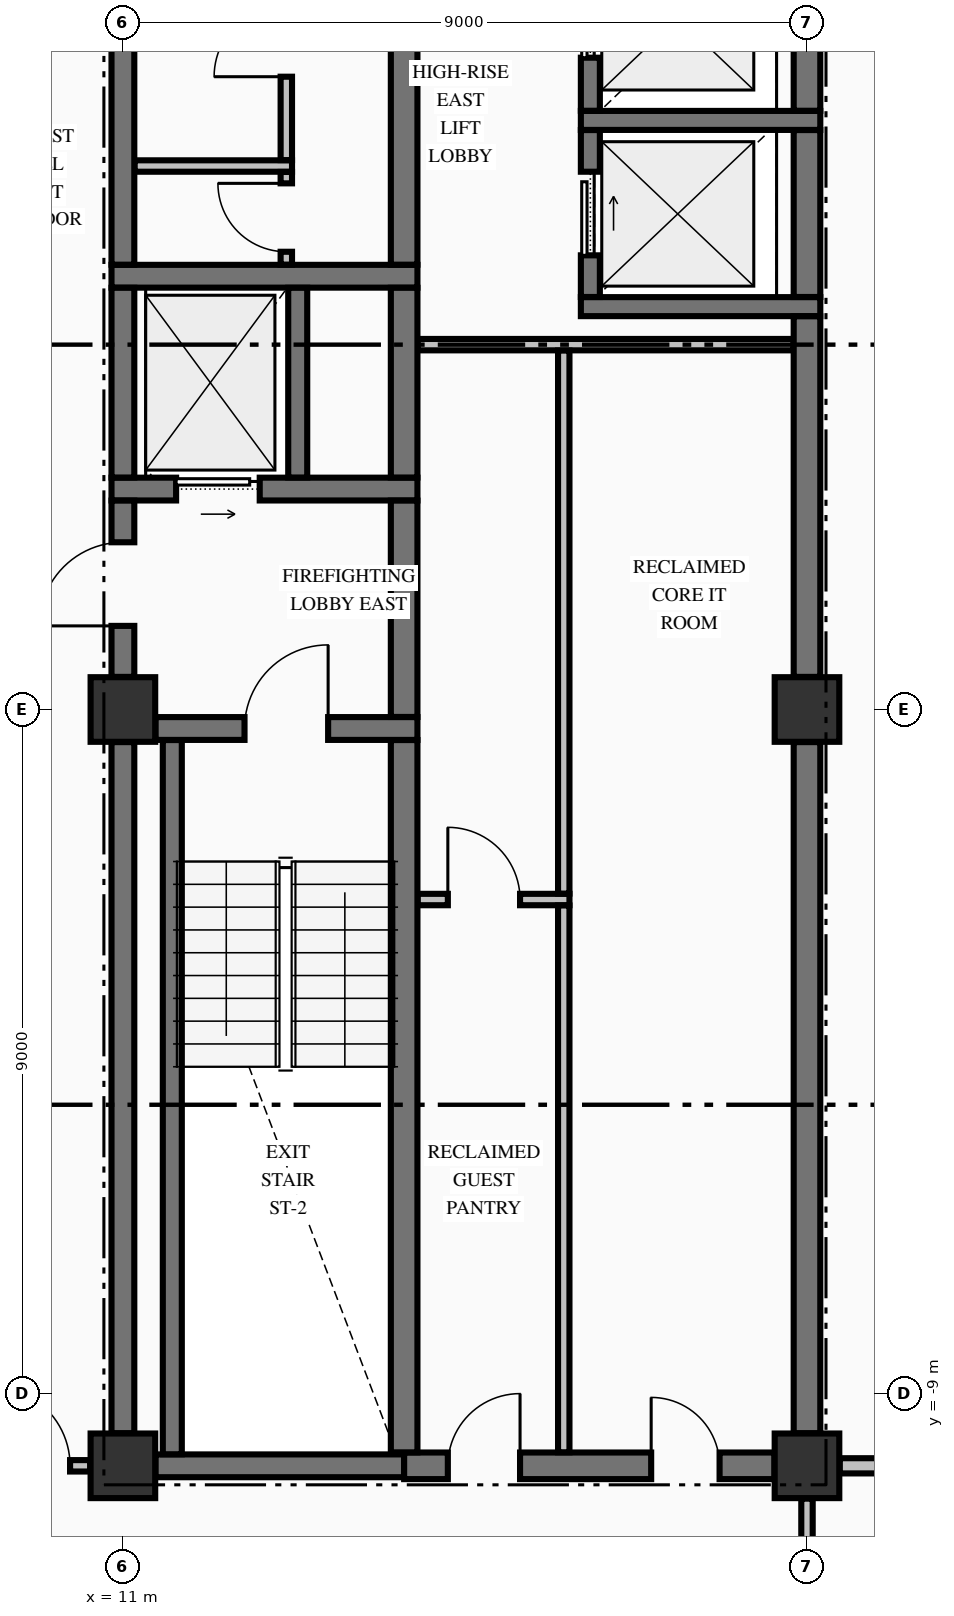
"""IFC4 building model, lengths in metres.
Left out: names, types, materials, properties, quantities, classifications, styles, units other than length and angle.
Written with IfcOpenShell. Run it as: python <this file> out.ifc"""

import sys

from ifc_helpers import new_model, si_unit, direction, frame, frame_2d, origin, origin_2d, place, context, subcontext, project, spatial, rectangle, extrude, element, fill, save


model = new_model("IFC4")
c1 = context("Model", 3, precision=1e-05, world=origin(), true_north=direction((0.0, 1.0)))
c2 = subcontext(c1, "Body", "Model", "MODEL_VIEW")
j1 = project(units=[si_unit("LENGTHUNIT", "METRE"), si_unit("PLANEANGLEUNIT", "RADIAN")], contexts=[c1])
p1 = place(None, origin())
s1 = spatial("IfcSite", under=j1, at=p1, CompositionType="ELEMENT")
p2 = place(p1, origin())
s2 = spatial("IfcBuilding", under=s1, at=p2, CompositionType="ELEMENT")
p3 = place(p2, frame((0.0, 0.0, 162.66)))
s3 = spatial("IfcBuildingStorey", under=s2, at=p3, CompositionType="ELEMENT", Elevation=162.66)
for number, where, z_axis, x_axis in (
    (1, (11.0, -9.95, -0.25), (0.0, 0.0, 1.0), (1.0, 0.0, 0.0)),
    (2, (11.0, 0.0, -0.25), (0.0, 0.0, 1.0), (1.0, 0.0, 0.0)),
    (3, (20.0, -9.95, -0.25), (0.0, 0.0, 1.0), (1.0, 0.0, 0.0)),
    (4, (20.0, 0.0, -0.25), (0.0, 0.0, 1.0), (1.0, 0.0, 0.0)),
):
    element("IfcColumn", number, at=place(p3, frame(where, z_axis=z_axis, x_axis=x_axis)), inside=s3, PredefinedType="COLUMN", context=c2, shape_type="SweptSolid", body=[
        extrude(rectangle(XDim=0.85, YDim=0.85, at=origin_2d()), origin(), (0.0, 0.0, 1.0), 3.4),
    ])
p4 = place(p3, frame((11.429, -9.95, 0.0), z_axis=(0.0, 0.0, 1.0), x_axis=(1.0, 0.0, 0.0)))
e5 = element("IfcWall", 5, at=p4, inside=s3, PredefinedType="SHEAR", context=c2, shape_type="SweptSolid", body=[
    extrude(rectangle(XDim=3.271, YDim=0.3, at=frame_2d((1.635, 0.0))), origin(), (0.0, 0.0, 1.0), 3.15),
])
p5 = place(p3, frame((14.7, -9.95, 0.0), z_axis=(0.0, 0.0, 1.0), x_axis=(1.0, 0.0, 0.0)))
e6 = element("IfcWall", 6, at=p5, inside=s3, PredefinedType="SHEAR", context=c2, shape_type="SweptSolid", body=[
    extrude(rectangle(XDim=4.871, YDim=0.35, at=frame_2d((2.436, 0.0))), origin(), (0.0, 0.0, 1.0), 3.15),
])
p6 = place(p5, frame((3.25, 0.0, 0.0)))
e7 = element("IfcOpeningElement", 7, at=p6, cuts=e6, PredefinedType="OPENING", context=c2, shape_type="SweptSolid", body=[
    extrude(rectangle(XDim=0.9, YDim=2.15, at=frame_2d((0.45, 1.075))), frame((0.0, 0.185, 0.0), z_axis=(0.0, -1.0, 0.0), x_axis=(1.0, 0.0, 0.0)), (0.0, 0.0, 1.0), 0.37),
])
p7 = place(p5, frame((0.575, 0.0, 0.0)))
e8 = element("IfcOpeningElement", 8, at=p7, cuts=e6, PredefinedType="OPENING", context=c2, shape_type="SweptSolid", body=[
    extrude(rectangle(XDim=0.95, YDim=2.15, at=frame_2d((0.475, 1.075))), frame((0.0, 0.185, 0.0), z_axis=(0.0, -1.0, 0.0), x_axis=(1.0, 0.0, 0.0)), (0.0, 0.0, 1.0), 0.37),
])
p8 = place(p3, frame((11.429, -0.25, 0.0), z_axis=(0.0, 0.0, 1.0), x_axis=(1.0, 0.0, 0.0)))
e9 = element("IfcWall", 9, at=p8, inside=s3, PredefinedType="SHEAR", context=c2, shape_type="SweptSolid", body=[
    extrude(rectangle(XDim=3.446, YDim=0.3, at=frame_2d((1.723, 0.0))), origin(), (0.0, 0.0, 1.0), 3.15),
])
p9 = place(p8, frame((1.171, 0.0, 0.0)))
e10 = element("IfcOpeningElement", 10, at=p9, cuts=e9, PredefinedType="OPENING", context=c2, shape_type="SweptSolid", body=[
    extrude(rectangle(XDim=1.1, YDim=2.15, at=frame_2d((0.55, 1.075))), frame((0.0, 0.16, 0.0), z_axis=(0.0, -1.0, 0.0), x_axis=(1.0, 0.0, 0.0)), (0.0, 0.0, 1.0), 0.32),
])
p10 = place(p3, frame((10.85, 2.9, 0.0), z_axis=(0.0, 0.0, 1.0), x_axis=(1.0, 0.0, 0.0)))
e11 = element("IfcWall", 11, at=p10, inside=s3, PredefinedType="SHEAR", context=c2, shape_type="SweptSolid", body=[
    extrude(rectangle(XDim=4.025, YDim=0.3, at=frame_2d((2.012, 0.0))), origin(), (0.0, 0.0, 1.0), 3.15),
])
p11 = place(p10, frame((0.85, 0.0, 0.0)))
e12 = element("IfcOpeningElement", 12, at=p11, cuts=e11, PredefinedType="OPENING", context=c2, shape_type="SweptSolid", body=[
    extrude(rectangle(XDim=1.1, YDim=2.2, at=frame_2d((0.55, 1.1))), frame((0.0, 0.16, 0.0), z_axis=(0.0, -1.0, 0.0), x_axis=(1.0, 0.0, 0.0)), (0.0, 0.0, 1.0), 0.32),
])
p12 = place(p3, frame((17.025, 5.3, 0.0), z_axis=(0.0, 0.0, 1.0), x_axis=(1.0, 0.0, 0.0)))
e13 = element("IfcWall", 13, at=p12, inside=s3, PredefinedType="SOLIDWALL", context=c2, shape_type="SweptSolid", body=[
    extrude(rectangle(XDim=3.15, YDim=0.25, at=frame_2d((1.575, 0.0))), origin(), (0.0, 0.0, 1.0), 3.15),
])
p13 = place(p3, frame((10.85, 5.7, 0.0), z_axis=(0.0, 0.0, 1.0), x_axis=(1.0, 0.0, 0.0)))
e14 = element("IfcWall", 14, at=p13, inside=s3, PredefinedType="SHEAR", context=c2, shape_type="SweptSolid", body=[
    extrude(rectangle(XDim=4.025, YDim=0.3, at=frame_2d((2.012, 0.0))), origin(), (0.0, 0.0, 1.0), 3.15),
])
p14 = place(p3, frame((17.025, 7.75, 0.0), z_axis=(0.0, 0.0, 1.0), x_axis=(1.0, 0.0, 0.0)))
e15 = element("IfcWall", 15, at=p14, inside=s3, PredefinedType="SOLIDWALL", context=c2, shape_type="SweptSolid", body=[
    extrude(rectangle(XDim=3.15, YDim=0.25, at=frame_2d((1.575, 0.0))), origin(), (0.0, 0.0, 1.0), 3.15),
])
p15 = place(p3, frame((-10.569, -9.95, 0.0), z_axis=(0.0, 0.0, 1.0), x_axis=(1.0, 0.0, 0.0)))
e16 = element("IfcWall", 16, at=p15, inside=s3, PredefinedType="PARTITIONING", context=c2, shape_type="SweptSolid", body=[
    extrude(rectangle(XDim=21.138, YDim=0.15, at=frame_2d((10.569, 0.0))), origin(), (0.0, 0.0, 1.0), 3.15),
])
p16 = place(p15, frame((0.264, 0.0, 0.0)))
e17 = element("IfcOpeningElement", 17, at=p16, cuts=e16, PredefinedType="OPENING", context=c2, shape_type="SweptSolid", body=[
    extrude(rectangle(XDim=1.05, YDim=2.15, at=frame_2d((0.525, 1.075))), frame((0.0, 0.085, 0.0), z_axis=(0.0, -1.0, 0.0), x_axis=(1.0, 0.0, 0.0)), (0.0, 0.0, 1.0), 0.17),
])
p17 = place(p15, frame((19.824, 0.0, 0.0)))
e18 = element("IfcOpeningElement", 18, at=p17, cuts=e16, PredefinedType="OPENING", context=c2, shape_type="SweptSolid", body=[
    extrude(rectangle(XDim=1.05, YDim=2.15, at=frame_2d((0.525, 1.075))), frame((0.0, 0.085, 0.0), z_axis=(0.0, -1.0, 0.0), x_axis=(1.0, 0.0, 0.0)), (0.0, 0.0, 1.0), 0.17),
])
p18 = place(p15, frame((13.774, 0.0, 0.0)))
e19 = element("IfcOpeningElement", 19, at=p18, cuts=e16, PredefinedType="OPENING", context=c2, shape_type="SweptSolid", body=[
    extrude(rectangle(XDim=0.95, YDim=2.15, at=frame_2d((0.475, 1.075))), frame((0.0, 0.085, 0.0), z_axis=(0.0, -1.0, 0.0), x_axis=(1.0, 0.0, 0.0)), (0.0, 0.0, 1.0), 0.17),
])
p19 = place(p3, frame((20.431, -9.95, 0.0), z_axis=(0.0, 0.0, 1.0), x_axis=(1.0, 0.0, 0.0)))
e20 = element("IfcWall", 20, at=p19, inside=s3, PredefinedType="PARTITIONING", context=c2, shape_type="SweptSolid", body=[
    extrude(rectangle(XDim=6.404, YDim=0.2, at=frame_2d((3.202, 0.0))), origin(), (0.0, 0.0, 1.0), 3.15),
])
p20 = place(p3, frame((14.878, -2.5, 0.0), z_axis=(0.0, 0.0, 1.0), x_axis=(1.0, 0.0, 0.0)))
e21 = element("IfcWall", 21, at=p20, inside=s3, PredefinedType="PARTITIONING", context=c2, shape_type="SweptSolid", body=[
    extrude(rectangle(XDim=1.997, YDim=0.15, at=frame_2d((0.999, 0.0))), origin(), (0.0, 0.0, 1.0), 3.15),
])
p21 = place(p20, frame((0.397, 0.0, 0.0)))
e22 = element("IfcOpeningElement", 22, at=p21, cuts=e21, PredefinedType="OPENING", context=c2, shape_type="SweptSolid", body=[
    extrude(rectangle(XDim=0.95, YDim=2.15, at=frame_2d((0.475, 1.075))), frame((0.0, 0.085, 0.0), z_axis=(0.0, -1.0, 0.0), x_axis=(1.0, 0.0, 0.0)), (0.0, 0.0, 1.0), 0.17),
])
p22 = place(p3, frame((14.878, 4.8, 0.0), z_axis=(0.0, 0.0, 1.0), x_axis=(1.0, 0.0, 0.0)))
e23 = element("IfcWall", 23, at=p22, inside=s3, PredefinedType="PARTITIONING", context=c2, shape_type="SweptSolid", body=[
    extrude(rectangle(XDim=4.944, YDim=0.15, at=frame_2d((2.472, 0.0))), origin(), (0.0, 0.0, 1.0), 3.15),
])
p23 = place(p3, frame((11.153, 7.15, 0.0), z_axis=(0.0, 0.0, 1.0), x_axis=(1.0, 0.0, 0.0)))
e24 = element("IfcWall", 24, at=p23, inside=s3, PredefinedType="PARTITIONING", context=c2, shape_type="SweptSolid", body=[
    extrude(rectangle(XDim=2.072, YDim=0.15, at=frame_2d((1.036, 0.0))), origin(), (0.0, 0.0, 1.0), 3.15),
])
p24 = place(p3, frame((11.0, -9.521, 0.0), z_axis=(0.0, 0.0, 1.0), x_axis=(0.0, 1.0, 0.0)))
e25 = element("IfcWall", 25, at=p24, inside=s3, PredefinedType="SHEAR", context=c2, shape_type="SweptSolid", body=[
    extrude(rectangle(XDim=9.092, YDim=0.3, at=frame_2d((4.546, 0.0))), origin(), (0.0, 0.0, 1.0), 3.15),
])
p25 = place(p3, frame((11.0, 0.429, 0.0), z_axis=(0.0, 0.0, 1.0), x_axis=(0.0, 1.0, 0.0)))
e26 = element("IfcWall", 26, at=p25, inside=s3, PredefinedType="SHEAR", context=c2, shape_type="SweptSolid", body=[
    extrude(rectangle(XDim=2.319, YDim=0.3, at=frame_2d((1.16, 0.0))), origin(), (0.0, 0.0, 1.0), 3.15),
])
p26 = place(p25, frame((0.671, 0.0, 0.0)))
e27 = element("IfcOpeningElement", 27, at=p26, cuts=e26, PredefinedType="OPENING", context=c2, shape_type="SweptSolid", body=[
    extrude(rectangle(XDim=1.1, YDim=2.15, at=frame_2d((0.55, 1.075))), frame((0.0, 0.16, 0.0), z_axis=(0.0, -1.0, 0.0), x_axis=(1.0, 0.0, 0.0)), (0.0, 0.0, 1.0), 0.32),
])
p27 = place(p3, frame((11.0, 3.052, 0.0), z_axis=(0.0, 0.0, 1.0), x_axis=(0.0, 1.0, 0.0)))
e28 = element("IfcWall", 28, at=p27, inside=s3, PredefinedType="SHEAR", context=c2, shape_type="SweptSolid", body=[
    extrude(rectangle(XDim=2.496, YDim=0.3, at=frame_2d((1.248, 0.0))), origin(), (0.0, 0.0, 1.0), 3.15),
])
p28 = place(p3, frame((11.0, 5.852, 0.0), z_axis=(0.0, 0.0, 1.0), x_axis=(0.0, 1.0, 0.0)))
e29 = element("IfcWall", 29, at=p28, inside=s3, PredefinedType="SHEAR", context=c2, shape_type="SweptSolid", body=[
    extrude(rectangle(XDim=4.219, YDim=0.3, at=frame_2d((2.109, 0.0))), origin(), (0.0, 0.0, 1.0), 3.15),
])
p29 = place(p3, frame((11.65, -9.798, 0.0), z_axis=(0.0, 0.0, 1.0), x_axis=(0.0, 1.0, 0.0)))
e30 = element("IfcWall", 30, at=p29, inside=s3, PredefinedType="SOLIDWALL", context=c2, shape_type="SweptSolid", body=[
    extrude(rectangle(XDim=9.396, YDim=0.25, at=frame_2d((4.698, 0.0))), origin(), (0.0, 0.0, 1.0), 3.15),
])
p30 = place(p3, frame((13.3, 3.052, 0.0), z_axis=(0.0, 0.0, 1.0), x_axis=(0.0, 1.0, 0.0)))
e31 = element("IfcWall", 31, at=p30, inside=s3, PredefinedType="SOLIDWALL", context=c2, shape_type="SweptSolid", body=[
    extrude(rectangle(XDim=2.496, YDim=0.25, at=frame_2d((1.248, 0.0))), origin(), (0.0, 0.0, 1.0), 3.15),
])
p31 = place(p3, frame((14.7, -9.773, 0.0), z_axis=(0.0, 0.0, 1.0), x_axis=(0.0, 1.0, 0.0)))
e32 = element("IfcWall", 32, at=p31, inside=s3, PredefinedType="SHEAR", context=c2, shape_type="SweptSolid", body=[
    extrude(rectangle(XDim=9.371, YDim=0.35, at=frame_2d((4.686, 0.0))), origin(), (0.0, 0.0, 1.0), 3.15),
])
p32 = place(p3, frame((14.7, -0.098, 0.0), z_axis=(0.0, 0.0, 1.0), x_axis=(0.0, 1.0, 0.0)))
e33 = element("IfcWall", 33, at=p32, inside=s3, PredefinedType="SHEAR", context=c2, shape_type="SweptSolid", body=[
    extrude(rectangle(XDim=2.846, YDim=0.35, at=frame_2d((1.423, 0.0))), origin(), (0.0, 0.0, 1.0), 3.15),
])
p33 = place(p3, frame((14.7, 3.052, 0.0), z_axis=(0.0, 0.0, 1.0), x_axis=(0.0, 1.0, 0.0)))
e34 = element("IfcWall", 34, at=p33, inside=s3, PredefinedType="SHEAR", context=c2, shape_type="SweptSolid", body=[
    extrude(rectangle(XDim=2.496, YDim=0.35, at=frame_2d((1.248, 0.0))), origin(), (0.0, 0.0, 1.0), 3.15),
])
p34 = place(p3, frame((14.7, 5.852, 0.0), z_axis=(0.0, 0.0, 1.0), x_axis=(0.0, 1.0, 0.0)))
e35 = element("IfcWall", 35, at=p34, inside=s3, PredefinedType="SHEAR", context=c2, shape_type="SweptSolid", body=[
    extrude(rectangle(XDim=4.471, YDim=0.35, at=frame_2d((2.235, 0.0))), origin(), (0.0, 0.0, 1.0), 3.15),
])
p35 = place(p3, frame((17.15, 5.427, 0.0), z_axis=(0.0, 0.0, 1.0), x_axis=(0.0, 1.0, 0.0)))
e36 = element("IfcWall", 36, at=p35, inside=s3, PredefinedType="SOLIDWALL", context=c2, shape_type="SweptSolid", body=[
    extrude(rectangle(XDim=2.196, YDim=0.25, at=frame_2d((1.098, 0.0))), origin(), (0.0, 0.0, 1.0), 3.15),
])
p36 = place(p35, frame((0.548, 0.0, 0.0)))
e37 = element("IfcOpeningElement", 37, at=p36, cuts=e36, PredefinedType="OPENING", context=c2, shape_type="SweptSolid", body=[
    extrude(rectangle(XDim=1.1, YDim=2.2, at=frame_2d((0.55, 1.1))), frame((0.0, 0.135, 0.0), z_axis=(0.0, -1.0, 0.0), x_axis=(1.0, 0.0, 0.0)), (0.0, 0.0, 1.0), 0.27),
])
p37 = place(p3, frame((17.15, 7.877, 0.0), z_axis=(0.0, 0.0, 1.0), x_axis=(0.0, 1.0, 0.0)))
e38 = element("IfcWall", 38, at=p37, inside=s3, PredefinedType="SOLIDWALL", context=c2, shape_type="SweptSolid", body=[
    extrude(rectangle(XDim=2.446, YDim=0.25, at=frame_2d((1.223, 0.0))), origin(), (0.0, 0.0, 1.0), 3.15),
])
p38 = place(p37, frame((0.698, 0.0, 0.0)))
e39 = element("IfcOpeningElement", 39, at=p38, cuts=e38, PredefinedType="OPENING", context=c2, shape_type="SweptSolid", body=[
    extrude(rectangle(XDim=1.1, YDim=2.2, at=frame_2d((0.55, 1.1))), frame((0.0, 0.135, 0.0), z_axis=(0.0, -1.0, 0.0), x_axis=(1.0, 0.0, 0.0)), (0.0, 0.0, 1.0), 0.27),
])
p39 = place(p3, frame((20.0, -9.521, 0.0), z_axis=(0.0, 0.0, 1.0), x_axis=(0.0, 1.0, 0.0)))
e40 = element("IfcWall", 40, at=p39, inside=s3, PredefinedType="SHEAR", context=c2, shape_type="SweptSolid", body=[
    extrude(rectangle(XDim=9.092, YDim=0.35, at=frame_2d((4.546, 0.0))), origin(), (0.0, 0.0, 1.0), 3.15),
])
p40 = place(p3, frame((20.0, 0.429, 0.0), z_axis=(0.0, 0.0, 1.0), x_axis=(0.0, 1.0, 0.0)))
e41 = element("IfcWall", 41, at=p40, inside=s3, PredefinedType="SHEAR", context=c2, shape_type="SweptSolid", body=[
    extrude(rectangle(XDim=4.744, YDim=0.35, at=frame_2d((2.372, 0.0))), origin(), (0.0, 0.0, 1.0), 3.15),
])
p41 = place(p3, frame((20.0, 5.427, 0.0), z_axis=(0.0, 0.0, 1.0), x_axis=(0.0, 1.0, 0.0)))
e42 = element("IfcWall", 42, at=p41, inside=s3, PredefinedType="SHEAR", context=c2, shape_type="SweptSolid", body=[
    extrude(rectangle(XDim=2.196, YDim=0.35, at=frame_2d((1.098, 0.0))), origin(), (0.0, 0.0, 1.0), 3.15),
])
p42 = place(p3, frame((20.0, 7.877, 0.0), z_axis=(0.0, 0.0, 1.0), x_axis=(0.0, 1.0, 0.0)))
e43 = element("IfcWall", 43, at=p42, inside=s3, PredefinedType="SHEAR", context=c2, shape_type="SweptSolid", body=[
    extrude(rectangle(XDim=2.194, YDim=0.35, at=frame_2d((1.097, 0.0))), origin(), (0.0, 0.0, 1.0), 3.15),
])
p43 = place(p3, frame((13.15, 5.853, 0.0), z_axis=(0.0, 0.0, 1.0), x_axis=(0.0, 1.0, 0.0)))
e44 = element("IfcWall", 44, at=p43, inside=s3, PredefinedType="PARTITIONING", context=c2, shape_type="SweptSolid", body=[
    extrude(rectangle(XDim=1.219, YDim=0.15, at=frame_2d((0.609, 0.0))), origin(), (0.0, 0.0, 1.0), 3.15),
])
p44 = place(p43, frame((0.169, 0.0, 0.0)))
e45 = element("IfcOpeningElement", 45, at=p44, cuts=e44, PredefinedType="OPENING", context=c2, shape_type="SweptSolid", body=[
    extrude(rectangle(XDim=0.9, YDim=2.15, at=frame_2d((0.45, 1.075))), frame((0.0, 0.085, 0.0), z_axis=(0.0, -1.0, 0.0), x_axis=(1.0, 0.0, 0.0)), (0.0, 0.0, 1.0), 0.17),
])
p45 = place(p3, frame((13.15, 7.228, 0.0), z_axis=(0.0, 0.0, 1.0), x_axis=(0.0, 1.0, 0.0)))
e46 = element("IfcWall", 46, at=p45, inside=s3, PredefinedType="PARTITIONING", context=c2, shape_type="SweptSolid", body=[
    extrude(rectangle(XDim=3.119, YDim=0.15, at=frame_2d((1.56, 0.0))), origin(), (0.0, 0.0, 1.0), 3.15),
])
p46 = place(p45, frame((1.097, 0.0, 0.0)))
e47 = element("IfcOpeningElement", 47, at=p46, cuts=e46, PredefinedType="OPENING", context=c2, shape_type="SweptSolid", body=[
    extrude(rectangle(XDim=0.95, YDim=2.15, at=frame_2d((0.475, 1.075))), frame((0.0, 0.085, 0.0), z_axis=(0.0, -1.0, 0.0), x_axis=(1.0, 0.0, 0.0)), (0.0, 0.0, 1.0), 0.17),
])
p47 = place(p3, frame((16.8, -9.772, 0.0), z_axis=(0.0, 0.0, 1.0), x_axis=(0.0, 1.0, 0.0)))
e48 = element("IfcWall", 48, at=p47, inside=s3, PredefinedType="PARTITIONING", context=c2, shape_type="SweptSolid", body=[
    extrude(rectangle(XDim=7.194, YDim=0.15, at=frame_2d((3.597, 0.0))), origin(), (0.0, 0.0, 1.0), 3.15),
])
p48 = place(p3, frame((16.8, -2.422, 0.0), z_axis=(0.0, 0.0, 1.0), x_axis=(0.0, 1.0, 0.0)))
e49 = element("IfcWall", 49, at=p48, inside=s3, PredefinedType="PARTITIONING", context=c2, shape_type="SweptSolid", body=[
    extrude(rectangle(XDim=7.144, YDim=0.15, at=frame_2d((3.572, 0.0))), origin(), (0.0, 0.0, 1.0), 3.15),
])
p49 = place(p3, frame((20.0, -12.997, 0.0), z_axis=(0.0, 0.0, 1.0), x_axis=(0.0, 1.0, 0.0)))
e50 = element("IfcWall", 50, at=p49, inside=s3, PredefinedType="PARTITIONING", context=c2, shape_type="SweptSolid", body=[
    extrude(rectangle(XDim=2.616, YDim=0.15, at=frame_2d((1.308, 0.0))), origin(), (0.0, 0.0, 1.0), 2.342),
])
p50 = place(p9, origin())
e51 = element("IfcDoor", 51, at=p50, inside=s3, OperationType="SINGLE_SWING_RIGHT", PredefinedType="DOOR", context=c2, shape_type="SweptSolid", body=[
    extrude(rectangle(XDim=1.1, YDim=2.15, at=frame_2d((0.55, 1.075))), frame((0.0, 0.025, 0.0), z_axis=(0.0, -1.0, 0.0), x_axis=(1.0, 0.0, 0.0)), (0.0, 0.0, 1.0), 0.05),
])
fill(e10, e51)
p51 = place(p26, origin())
e52 = element("IfcDoor", 52, at=p51, inside=s3, OperationType="SINGLE_SWING_LEFT", PredefinedType="DOOR", context=c2, shape_type="SweptSolid", body=[
    extrude(rectangle(XDim=1.1, YDim=2.15, at=frame_2d((0.55, 1.075))), frame((0.0, 0.025, 0.0), z_axis=(0.0, -1.0, 0.0), x_axis=(1.0, 0.0, 0.0)), (0.0, 0.0, 1.0), 0.05),
])
fill(e27, e52)
p52 = place(p11, origin())
e53 = element("IfcDoor", 53, at=p52, inside=s3, OperationType="SLIDING_TO_RIGHT", PredefinedType="DOOR", context=c2, shape_type="SweptSolid", body=[
    extrude(rectangle(XDim=1.1, YDim=2.2, at=frame_2d((0.55, 1.1))), frame((0.0, 0.025, 0.0), z_axis=(0.0, -1.0, 0.0), x_axis=(1.0, 0.0, 0.0)), (0.0, 0.0, 1.0), 0.05),
])
fill(e12, e53)
p53 = place(p44, origin())
e54 = element("IfcDoor", 54, at=p53, inside=s3, OperationType="SINGLE_SWING_RIGHT", PredefinedType="DOOR", context=c2, shape_type="SweptSolid", body=[
    extrude(rectangle(XDim=0.9, YDim=2.15, at=frame_2d((0.45, 1.075))), frame((0.0, 0.025, 0.0), z_axis=(0.0, -1.0, 0.0), x_axis=(1.0, 0.0, 0.0)), (0.0, 0.0, 1.0), 0.05),
])
fill(e45, e54)
p54 = place(p46, origin())
e55 = element("IfcDoor", 55, at=p54, inside=s3, OperationType="SINGLE_SWING_LEFT", PredefinedType="DOOR", context=c2, shape_type="SweptSolid", body=[
    extrude(rectangle(XDim=0.95, YDim=2.15, at=frame_2d((0.475, 1.075))), frame((0.0, 0.025, 0.0), z_axis=(0.0, -1.0, 0.0), x_axis=(1.0, 0.0, 0.0)), (0.0, 0.0, 1.0), 0.05),
])
fill(e47, e55)
p55 = place(p36, origin())
e56 = element("IfcDoor", 56, at=p55, inside=s3, OperationType="SLIDING_TO_RIGHT", PredefinedType="DOOR", context=c2, shape_type="SweptSolid", body=[
    extrude(rectangle(XDim=1.1, YDim=2.2, at=frame_2d((0.55, 1.1))), frame((0.0, 0.025, 0.0), z_axis=(0.0, -1.0, 0.0), x_axis=(1.0, 0.0, 0.0)), (0.0, 0.0, 1.0), 0.05),
])
fill(e37, e56)
p56 = place(p38, origin())
e57 = element("IfcDoor", 57, at=p56, inside=s3, OperationType="SLIDING_TO_RIGHT", PredefinedType="DOOR", context=c2, shape_type="SweptSolid", body=[
    extrude(rectangle(XDim=1.1, YDim=2.2, at=frame_2d((0.55, 1.1))), frame((0.0, 0.025, 0.0), z_axis=(0.0, -1.0, 0.0), x_axis=(1.0, 0.0, 0.0)), (0.0, 0.0, 1.0), 0.05),
])
fill(e39, e57)
p57 = place(p6, origin())
e58 = element("IfcDoor", 58, at=p57, inside=s3, OperationType="SINGLE_SWING_LEFT", PredefinedType="DOOR", context=c2, shape_type="SweptSolid", body=[
    extrude(rectangle(XDim=0.9, YDim=2.15, at=frame_2d((0.45, 1.075))), frame((0.0, 0.025, 0.0), z_axis=(0.0, -1.0, 0.0), x_axis=(1.0, 0.0, 0.0)), (0.0, 0.0, 1.0), 0.05),
])
fill(e7, e58)
p58 = place(p7, origin())
e59 = element("IfcDoor", 59, at=p58, inside=s3, OperationType="SINGLE_SWING_RIGHT", PredefinedType="DOOR", context=c2, shape_type="SweptSolid", body=[
    extrude(rectangle(XDim=0.95, YDim=2.15, at=frame_2d((0.475, 1.075))), frame((0.0, 0.025, 0.0), z_axis=(0.0, -1.0, 0.0), x_axis=(1.0, 0.0, 0.0)), (0.0, 0.0, 1.0), 0.05),
])
fill(e8, e59)
p59 = place(p21, origin())
e60 = element("IfcDoor", 60, at=p59, inside=s3, OperationType="SINGLE_SWING_LEFT", PredefinedType="DOOR", context=c2, shape_type="SweptSolid", body=[
    extrude(rectangle(XDim=0.95, YDim=2.15, at=frame_2d((0.475, 1.075))), frame((0.0, 0.025, 0.0), z_axis=(0.0, -1.0, 0.0), x_axis=(1.0, 0.0, 0.0)), (0.0, 0.0, 1.0), 0.05),
])
fill(e22, e60)
p60 = place(p17, origin())
e61 = element("IfcDoor", 61, at=p60, inside=s3, OperationType="SINGLE_SWING_LEFT", PredefinedType="DOOR", context=c2, shape_type="SweptSolid", body=[
    extrude(rectangle(XDim=1.05, YDim=2.15, at=frame_2d((0.525, 1.075))), frame((0.0, 0.025, 0.0), z_axis=(0.0, -1.0, 0.0), x_axis=(1.0, 0.0, 0.0)), (0.0, 0.0, 1.0), 0.05),
])
fill(e18, e61)
save(model, sys.argv[1])
